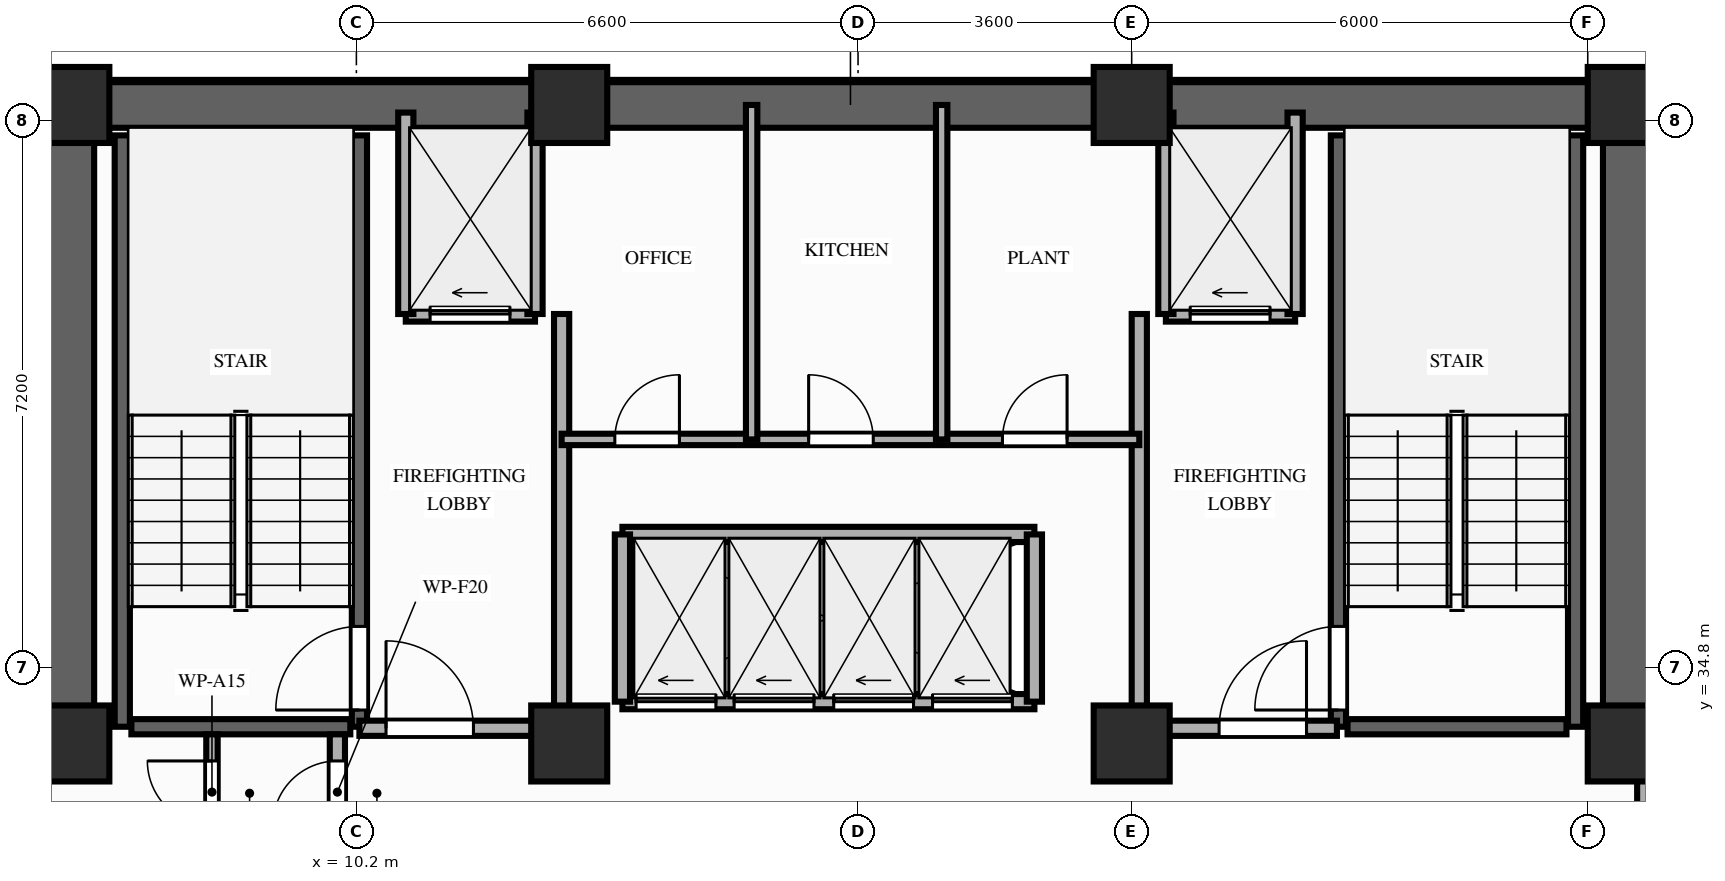
"""IFC4 building model, lengths in metres.
Left out: names, types, materials, properties, quantities, classifications, styles, units other than length and angle.
Written with IfcOpenShell. Run it as: python <this file> out.ifc"""

import sys

from ifc_helpers import new_model, si_unit, direction, frame, frame_2d, origin, origin_2d, place, context, subcontext, project, spatial, rectangle, extrude, element, fill, save


model = new_model("IFC4")
c1 = context("Model", 3, precision=1e-05, world=origin(), true_north=direction((0.0, 1.0)))
c2 = subcontext(c1, "Body", "Model", "MODEL_VIEW")
j1 = project(units=[si_unit("LENGTHUNIT", "METRE"), si_unit("PLANEANGLEUNIT", "RADIAN")], contexts=[c1])
p1 = place(None, origin())
s1 = spatial("IfcSite", under=j1, at=p1, CompositionType="ELEMENT")
p2 = place(p1, origin())
s2 = spatial("IfcBuilding", under=s1, at=p2, CompositionType="ELEMENT")
p3 = place(p2, frame((0.0, 0.0, 123.4)))
s3 = spatial("IfcBuildingStorey", under=s2, at=p3, CompositionType="ELEMENT", Elevation=123.4)
for number, where, z_axis, x_axis in (
    (1, (6.45, 33.8, 0.0), (0.0, 0.0, 1.0), (1.0, 0.0, 0.0)),
    (2, (13.0, 33.8, 0.0), (0.0, 0.0, 1.0), (1.0, 0.0, 0.0)),
    (3, (20.4, 33.8, 0.0), (0.0, 0.0, 1.0), (1.0, 0.0, 0.0)),
    (4, (26.9, 33.8, 0.0), (0.0, 0.0, 1.0), (1.0, 0.0, 0.0)),
    (5, (6.45, 42.2, 0.0), (0.0, 0.0, 1.0), (1.0, 0.0, 0.0)),
    (6, (13.0, 42.2, 0.0), (0.0, 0.0, 1.0), (1.0, 0.0, 0.0)),
    (7, (20.4, 42.2, 0.0), (0.0, 0.0, 1.0), (1.0, 0.0, 0.0)),
    (8, (26.9, 42.2, 0.0), (0.0, 0.0, 1.0), (1.0, 0.0, 0.0)),
):
    element("IfcColumn", number, at=place(p3, frame(where, z_axis=z_axis, x_axis=x_axis)), inside=s3, PredefinedType="COLUMN", context=c2, shape_type="SweptSolid", body=[
        extrude(rectangle(XDim=1.0, YDim=1.0, at=origin_2d()), origin(), (0.0, 0.0, 1.0), 3.2),
    ])
p4 = place(p3, frame((6.45, 42.2, 0.0), z_axis=(0.0, 0.0, 1.0), x_axis=(1.0, 0.0, 0.0)))
e9 = element("IfcWall", 9, at=p4, inside=s3, PredefinedType="SHEAR", context=c2, shape_type="SweptSolid", body=[
    extrude(rectangle(XDim=20.45, YDim=0.6, at=frame_2d((10.225, 0.0))), origin(), (0.0, 0.0, 1.0), 3.02),
])
for number, where, z_axis, x_axis in (
    (10, (6.45, 33.8, 0.0), (0.0, 0.0, 1.0), (0.0, 1.0, 0.0)),
    (11, (26.9, 33.8, 0.0), (0.0, 0.0, 1.0), (0.0, 1.0, 0.0)),
):
    element("IfcWall", number, at=place(p3, frame(where, z_axis=z_axis, x_axis=x_axis)), inside=s3, PredefinedType="SHEAR", context=c2, shape_type="SweptSolid", body=[
        extrude(rectangle(XDim=7.95, YDim=0.6, at=frame_2d((3.975, 0.0))), origin(), (0.0, 0.0, 1.0), 3.02),
    ])
p5 = place(p3, frame((7.12, 34.02, 0.0), z_axis=(0.0, 0.0, 1.0), x_axis=(0.0, 1.0, 0.0)))
e12 = element("IfcWall", 12, at=p5, inside=s3, PredefinedType="SHEAR", context=c2, shape_type="SweptSolid", body=[
    extrude(rectangle(XDim=7.78, YDim=0.2, at=frame_2d((3.89, 0.0))), origin(), (0.0, 0.0, 1.0), 3.02),
])
p6 = place(p3, frame((10.24, 34.02, 0.0), z_axis=(0.0, 0.0, 1.0), x_axis=(0.0, 1.0, 0.0)))
e13 = element("IfcWall", 13, at=p6, inside=s3, PredefinedType="SHEAR", context=c2, shape_type="SweptSolid", body=[
    extrude(rectangle(XDim=7.78, YDim=0.2, at=frame_2d((3.89, 0.0))), origin(), (0.0, 0.0, 1.0), 3.02),
])
p7 = place(p6, frame((0.22, 0.0, 0.0)))
e14 = element("IfcOpeningElement", 14, at=p7, cuts=e13, PredefinedType="OPENING", context=c2, shape_type="SweptSolid", body=[
    extrude(rectangle(XDim=1.1, YDim=2.15, at=frame_2d((0.55, 1.075))), frame((0.0, 0.11, 0.0), z_axis=(0.0, -1.0, 0.0), x_axis=(1.0, 0.0, 0.0)), (0.0, 0.0, 1.0), 0.22),
])
p8 = place(p3, frame((7.24, 34.02, 0.0), z_axis=(0.0, 0.0, 1.0), x_axis=(1.0, 0.0, 0.0)))
e15 = element("IfcWall", 15, at=p8, inside=s3, PredefinedType="SHEAR", context=c2, shape_type="SweptSolid", body=[
    extrude(rectangle(XDim=2.88, YDim=0.2, at=frame_2d((1.44, 0.0))), origin(), (0.0, 0.0, 1.0), 3.02),
])
p9 = place(p3, frame((23.12, 34.02, 0.0), z_axis=(0.0, 0.0, 1.0), x_axis=(0.0, 1.0, 0.0)))
e16 = element("IfcWall", 16, at=p9, inside=s3, PredefinedType="SHEAR", context=c2, shape_type="SweptSolid", body=[
    extrude(rectangle(XDim=7.78, YDim=0.2, at=frame_2d((3.89, 0.0))), origin(), (0.0, 0.0, 1.0), 3.02),
])
p10 = place(p9, frame((0.22, 0.0, 0.0)))
e17 = element("IfcOpeningElement", 17, at=p10, cuts=e16, PredefinedType="OPENING", context=c2, shape_type="SweptSolid", body=[
    extrude(rectangle(XDim=1.1, YDim=2.15, at=frame_2d((0.55, 1.075))), frame((0.0, 0.11, 0.0), z_axis=(0.0, -1.0, 0.0), x_axis=(1.0, 0.0, 0.0)), (0.0, 0.0, 1.0), 0.22),
])
p11 = place(p3, frame((26.24, 34.02, 0.0), z_axis=(0.0, 0.0, 1.0), x_axis=(0.0, 1.0, 0.0)))
e18 = element("IfcWall", 18, at=p11, inside=s3, PredefinedType="SHEAR", context=c2, shape_type="SweptSolid", body=[
    extrude(rectangle(XDim=7.78, YDim=0.2, at=frame_2d((3.89, 0.0))), origin(), (0.0, 0.0, 1.0), 3.02),
])
p12 = place(p3, frame((23.24, 34.02, 0.0), z_axis=(0.0, 0.0, 1.0), x_axis=(1.0, 0.0, 0.0)))
e19 = element("IfcWall", 19, at=p12, inside=s3, PredefinedType="SHEAR", context=c2, shape_type="SweptSolid", body=[
    extrude(rectangle(XDim=2.88, YDim=0.2, at=frame_2d((1.44, 0.0))), origin(), (0.0, 0.0, 1.0), 3.02),
])
p13 = place(p3, frame((10.85, 39.45, 0.0), z_axis=(0.0, 0.0, 1.0), x_axis=(1.0, 0.0, 0.0)))
e20 = element("IfcWall", 20, at=p13, inside=s3, PredefinedType="MOVABLE", context=c2, shape_type="SweptSolid", body=[
    extrude(rectangle(XDim=1.7, YDim=0.2, at=frame_2d((0.85, 0.0))), origin(), (0.0, 0.0, 1.0), 3.02),
])
p14 = place(p13, frame((0.32, 0.0, 0.0)))
e21 = element("IfcOpeningElement", 21, at=p14, cuts=e20, PredefinedType="OPENING", context=c2, shape_type="SweptSolid", body=[
    extrude(rectangle(XDim=1.05, YDim=2.15, at=frame_2d((0.525, 1.075))), frame((0.0, 0.11, 0.0), z_axis=(0.0, -1.0, 0.0), x_axis=(1.0, 0.0, 0.0)), (0.0, 0.0, 1.0), 0.22),
])
p15 = place(p3, frame((20.85, 39.45, 0.0), z_axis=(0.0, 0.0, 1.0), x_axis=(1.0, 0.0, 0.0)))
e22 = element("IfcWall", 22, at=p15, inside=s3, PredefinedType="MOVABLE", context=c2, shape_type="SweptSolid", body=[
    extrude(rectangle(XDim=1.7, YDim=0.2, at=frame_2d((0.85, 0.0))), origin(), (0.0, 0.0, 1.0), 3.02),
])
p16 = place(p15, frame((0.32, 0.0, 0.0)))
e23 = element("IfcOpeningElement", 23, at=p16, cuts=e22, PredefinedType="OPENING", context=c2, shape_type="SweptSolid", body=[
    extrude(rectangle(XDim=1.05, YDim=2.15, at=frame_2d((0.525, 1.075))), frame((0.0, 0.11, 0.0), z_axis=(0.0, -1.0, 0.0), x_axis=(1.0, 0.0, 0.0)), (0.0, 0.0, 1.0), 0.22),
])
for number, where, z_axis, x_axis in (
    (24, (10.85, 39.45, 0.0), (0.0, 0.0, 1.0), (0.0, 1.0, 0.0)),
    (25, (12.55, 39.45, 0.0), (0.0, 0.0, 1.0), (0.0, 1.0, 0.0)),
):
    element("IfcWall", number, at=place(p3, frame(where, z_axis=z_axis, x_axis=x_axis)), inside=s3, PredefinedType="MOVABLE", context=c2, shape_type="SweptSolid", body=[
        extrude(rectangle(XDim=2.65, YDim=0.2, at=frame_2d((1.325, 0.0))), origin(), (0.0, 0.0, 1.0), 2.45),
    ])
p17 = place(p3, frame((12.9, 34.0, 0.0), z_axis=(0.0, 0.0, 1.0), x_axis=(0.0, 1.0, 0.0)))
e26 = element("IfcWall", 26, at=p17, inside=s3, PredefinedType="PARTITIONING", context=c2, shape_type="SweptSolid", body=[
    extrude(rectangle(XDim=5.45, YDim=0.2, at=frame_2d((2.725, 0.0))), origin(), (0.0, 0.0, 1.0), 2.45),
])
p18 = place(p3, frame((10.24, 34.0, 0.0), z_axis=(0.0, 0.0, 1.0), x_axis=(1.0, 0.0, 0.0)))
e27 = element("IfcWall", 27, at=p18, inside=s3, PredefinedType="PARTITIONING", context=c2, shape_type="SweptSolid", body=[
    extrude(rectangle(XDim=2.66, YDim=0.2, at=frame_2d((1.33, 0.0))), origin(), (0.0, 0.0, 1.0), 2.45),
])
p19 = place(p18, frame((0.35, 0.0, 0.0)))
e28 = element("IfcOpeningElement", 28, at=p19, cuts=e27, PredefinedType="OPENING", context=c2, shape_type="SweptSolid", body=[
    extrude(rectangle(XDim=1.15, YDim=2.15, at=frame_2d((0.575, 1.075))), frame((0.0, 0.11, 0.0), z_axis=(0.0, -1.0, 0.0), x_axis=(1.0, 0.0, 0.0)), (0.0, 0.0, 1.0), 0.22),
])
for number, where, z_axis, x_axis in (
    (29, (20.85, 39.45, 0.0), (0.0, 0.0, 1.0), (0.0, 1.0, 0.0)),
    (30, (22.55, 39.45, 0.0), (0.0, 0.0, 1.0), (0.0, 1.0, 0.0)),
):
    element("IfcWall", number, at=place(p3, frame(where, z_axis=z_axis, x_axis=x_axis)), inside=s3, PredefinedType="MOVABLE", context=c2, shape_type="SweptSolid", body=[
        extrude(rectangle(XDim=2.65, YDim=0.2, at=frame_2d((1.325, 0.0))), origin(), (0.0, 0.0, 1.0), 2.45),
    ])
p20 = place(p3, frame((20.5, 34.0, 0.0), z_axis=(0.0, 0.0, 1.0), x_axis=(0.0, 1.0, 0.0)))
e31 = element("IfcWall", 31, at=p20, inside=s3, PredefinedType="PARTITIONING", context=c2, shape_type="SweptSolid", body=[
    extrude(rectangle(XDim=5.45, YDim=0.2, at=frame_2d((2.725, 0.0))), origin(), (0.0, 0.0, 1.0), 2.45),
])
p21 = place(p3, frame((20.5, 34.0, 0.0), z_axis=(0.0, 0.0, 1.0), x_axis=(1.0, 0.0, 0.0)))
e32 = element("IfcWall", 32, at=p21, inside=s3, PredefinedType="PARTITIONING", context=c2, shape_type="SweptSolid", body=[
    extrude(rectangle(XDim=2.6, YDim=0.2, at=frame_2d((1.3, 0.0))), origin(), (0.0, 0.0, 1.0), 2.45),
])
p22 = place(p21, frame((1.05, 0.0, 0.0)))
e33 = element("IfcOpeningElement", 33, at=p22, cuts=e32, PredefinedType="OPENING", context=c2, shape_type="SweptSolid", body=[
    extrude(rectangle(XDim=1.15, YDim=2.15, at=frame_2d((0.575, 1.075))), frame((0.0, 0.11, 0.0), z_axis=(0.0, -1.0, 0.0), x_axis=(1.0, 0.0, 0.0)), (0.0, 0.0, 1.0), 0.22),
])
p23 = place(p3, frame((9.95, 32.4, 0.0), z_axis=(0.0, 0.0, 1.0), x_axis=(0.0, 1.0, 0.0)))
e34 = element("IfcWall", 34, at=p23, inside=s3, PredefinedType="PARTITIONING", context=c2, shape_type="SweptSolid", body=[
    extrude(rectangle(XDim=1.52, YDim=0.2, at=frame_2d((0.76, 0.0))), origin(), (0.0, 0.0, 1.0), 2.45),
])
p24 = place(p23, frame((0.32, 0.0, 0.0)))
e35 = element("IfcOpeningElement", 35, at=p24, cuts=e34, PredefinedType="OPENING", context=c2, shape_type="SweptSolid", body=[
    extrude(rectangle(XDim=0.85, YDim=2.05, at=frame_2d((0.425, 1.025))), frame((0.0, 0.11, 0.0), z_axis=(0.0, -1.0, 0.0), x_axis=(1.0, 0.0, 0.0)), (0.0, 0.0, 1.0), 0.22),
])
p25 = place(p3, frame((8.3, 32.4, 0.0), z_axis=(0.0, 0.0, 1.0), x_axis=(0.0, 1.0, 0.0)))
e36 = element("IfcWall", 36, at=p25, inside=s3, PredefinedType="PARTITIONING", context=c2, shape_type="SweptSolid", body=[
    extrude(rectangle(XDim=1.52, YDim=0.15, at=frame_2d((0.76, 0.0))), origin(), (0.0, 0.0, 1.0), 2.45),
])
p26 = place(p25, frame((0.32, 0.0, 0.0)))
e37 = element("IfcOpeningElement", 37, at=p26, cuts=e36, PredefinedType="OPENING", context=c2, shape_type="SweptSolid", body=[
    extrude(rectangle(XDim=0.85, YDim=2.05, at=frame_2d((0.425, 1.025))), frame((0.0, 0.085, 0.0), z_axis=(0.0, -1.0, 0.0), x_axis=(1.0, 0.0, 0.0)), (0.0, 0.0, 1.0), 0.17),
])
p27 = place(p3, frame((12.9, 37.8, 0.0), z_axis=(0.0, 0.0, 1.0), x_axis=(1.0, 0.0, 0.0)))
e38 = element("IfcWall", 38, at=p27, inside=s3, PredefinedType="PARTITIONING", context=c2, shape_type="SweptSolid", body=[
    extrude(rectangle(XDim=7.6, YDim=0.15, at=frame_2d((3.8, 0.0))), origin(), (0.0, 0.0, 1.0), 3.02),
])
p28 = place(p27, frame((0.7, 0.0, 0.0)))
e39 = element("IfcOpeningElement", 39, at=p28, cuts=e38, PredefinedType="OPENING", context=c2, shape_type="SweptSolid", body=[
    extrude(rectangle(XDim=0.85, YDim=2.05, at=frame_2d((0.425, 1.025))), frame((0.0, 0.085, 0.0), z_axis=(0.0, -1.0, 0.0), x_axis=(1.0, 0.0, 0.0)), (0.0, 0.0, 1.0), 0.17),
])
p29 = place(p27, frame((3.25, 0.0, 0.0)))
e40 = element("IfcOpeningElement", 40, at=p29, cuts=e38, PredefinedType="OPENING", context=c2, shape_type="SweptSolid", body=[
    extrude(rectangle(XDim=0.85, YDim=2.05, at=frame_2d((0.425, 1.025))), frame((0.0, 0.085, 0.0), z_axis=(0.0, -1.0, 0.0), x_axis=(1.0, 0.0, 0.0)), (0.0, 0.0, 1.0), 0.17),
])
p30 = place(p27, frame((5.8, 0.0, 0.0)))
e41 = element("IfcOpeningElement", 41, at=p30, cuts=e38, PredefinedType="OPENING", context=c2, shape_type="SweptSolid", body=[
    extrude(rectangle(XDim=0.85, YDim=2.05, at=frame_2d((0.425, 1.025))), frame((0.0, 0.085, 0.0), z_axis=(0.0, -1.0, 0.0), x_axis=(1.0, 0.0, 0.0)), (0.0, 0.0, 1.0), 0.17),
])
for number, where, z_axis, x_axis in (
    (42, (15.4, 37.8, 0.0), (0.0, 0.0, 1.0), (0.0, 1.0, 0.0)),
    (43, (17.9, 37.8, 0.0), (0.0, 0.0, 1.0), (0.0, 1.0, 0.0)),
):
    element("IfcWall", number, at=place(p3, frame(where, z_axis=z_axis, x_axis=x_axis)), inside=s3, PredefinedType="PARTITIONING", context=c2, shape_type="SweptSolid", body=[
        extrude(rectangle(XDim=4.4, YDim=0.15, at=frame_2d((2.2, 0.0))), origin(), (0.0, 0.0, 1.0), 2.45),
    ])
p31 = place(p3, frame((13.7, 34.35, 0.0), z_axis=(0.0, 0.0, 1.0), x_axis=(1.0, 0.0, 0.0)))
e44 = element("IfcWall", 44, at=p31, inside=s3, PredefinedType="MOVABLE", context=c2, shape_type="SweptSolid", body=[
    extrude(rectangle(XDim=5.42, YDim=0.2, at=frame_2d((2.71, 0.0))), origin(), (0.0, 0.0, 1.0), 3.02),
])
p32 = place(p31, frame((0.18, 0.0, 0.0)))
e45 = element("IfcOpeningElement", 45, at=p32, cuts=e44, PredefinedType="OPENING", context=c2, shape_type="SweptSolid", body=[
    extrude(rectangle(XDim=1.05, YDim=2.15, at=frame_2d((0.525, 1.075))), frame((0.0, 0.11, 0.0), z_axis=(0.0, -1.0, 0.0), x_axis=(1.0, 0.0, 0.0)), (0.0, 0.0, 1.0), 0.22),
])
p33 = place(p31, frame((1.47, 0.0, 0.0)))
e46 = element("IfcOpeningElement", 46, at=p33, cuts=e44, PredefinedType="OPENING", context=c2, shape_type="SweptSolid", body=[
    extrude(rectangle(XDim=1.05, YDim=2.15, at=frame_2d((0.525, 1.075))), frame((0.0, 0.11, 0.0), z_axis=(0.0, -1.0, 0.0), x_axis=(1.0, 0.0, 0.0)), (0.0, 0.0, 1.0), 0.22),
])
p34 = place(p31, frame((2.78, 0.0, 0.0)))
e47 = element("IfcOpeningElement", 47, at=p34, cuts=e44, PredefinedType="OPENING", context=c2, shape_type="SweptSolid", body=[
    extrude(rectangle(XDim=1.05, YDim=2.15, at=frame_2d((0.525, 1.075))), frame((0.0, 0.11, 0.0), z_axis=(0.0, -1.0, 0.0), x_axis=(1.0, 0.0, 0.0)), (0.0, 0.0, 1.0), 0.22),
])
p35 = place(p31, frame((4.08, 0.0, 0.0)))
e48 = element("IfcOpeningElement", 48, at=p35, cuts=e44, PredefinedType="OPENING", context=c2, shape_type="SweptSolid", body=[
    extrude(rectangle(XDim=1.05, YDim=2.15, at=frame_2d((0.525, 1.075))), frame((0.0, 0.11, 0.0), z_axis=(0.0, -1.0, 0.0), x_axis=(1.0, 0.0, 0.0)), (0.0, 0.0, 1.0), 0.22),
])
p36 = place(p3, frame((13.7, 36.55, 0.0), z_axis=(0.0, 0.0, 1.0), x_axis=(1.0, 0.0, 0.0)))
e49 = element("IfcWall", 49, at=p36, inside=s3, PredefinedType="MOVABLE", context=c2, shape_type="SweptSolid", body=[
    extrude(rectangle(XDim=5.42, YDim=0.2, at=frame_2d((2.71, 0.0))), origin(), (0.0, 0.0, 1.0), 3.02),
])
for number, where, z_axis, x_axis in (
    (50, (13.7, 34.35, 0.0), (0.0, 0.0, 1.0), (0.0, 1.0, 0.0)),
    (51, (19.12, 34.35, 0.0), (0.0, 0.0, 1.0), (0.0, 1.0, 0.0)),
):
    element("IfcWall", number, at=place(p3, frame(where, z_axis=z_axis, x_axis=x_axis)), inside=s3, PredefinedType="MOVABLE", context=c2, shape_type="SweptSolid", body=[
        extrude(rectangle(XDim=2.2, YDim=0.2, at=frame_2d((1.1, 0.0))), origin(), (0.0, 0.0, 1.0), 3.02),
    ])
p37 = place(p3, frame((27.15, 32.6, 0.0), z_axis=(0.0, 0.0, 1.0), x_axis=(0.0, 1.0, 0.0)))
e52 = element("IfcWall", 52, at=p37, inside=s3, PredefinedType="PARTITIONING", context=c2, shape_type="SweptSolid", body=[
    extrude(rectangle(XDim=1.08, YDim=0.2, at=frame_2d((0.54, 0.0))), origin(), (0.0, 0.0, 1.0), 2.45),
])
p38 = place(p7, origin())
e53 = element("IfcDoor", 53, at=p38, inside=s3, OperationType="SINGLE_SWING_LEFT", PredefinedType="DOOR", context=c2, shape_type="SweptSolid", body=[
    extrude(rectangle(XDim=1.1, YDim=2.15, at=frame_2d((0.55, 1.075))), frame((0.0, 0.025, 0.0), z_axis=(0.0, -1.0, 0.0), x_axis=(1.0, 0.0, 0.0)), (0.0, 0.0, 1.0), 0.05),
])
fill(e14, e53)
p39 = place(p10, origin())
e54 = element("IfcDoor", 54, at=p39, inside=s3, OperationType="SINGLE_SWING_LEFT", PredefinedType="DOOR", context=c2, shape_type="SweptSolid", body=[
    extrude(rectangle(XDim=1.1, YDim=2.15, at=frame_2d((0.55, 1.075))), frame((0.0, 0.025, 0.0), z_axis=(0.0, -1.0, 0.0), x_axis=(1.0, 0.0, 0.0)), (0.0, 0.0, 1.0), 0.05),
])
fill(e17, e54)
p40 = place(p14, origin())
e55 = element("IfcDoor", 55, at=p40, inside=s3, OperationType="SLIDING_TO_LEFT", PredefinedType="DOOR", context=c2, shape_type="SweptSolid", body=[
    extrude(rectangle(XDim=1.05, YDim=2.15, at=frame_2d((0.525, 1.075))), frame((0.0, 0.025, 0.0), z_axis=(0.0, -1.0, 0.0), x_axis=(1.0, 0.0, 0.0)), (0.0, 0.0, 1.0), 0.05),
])
fill(e21, e55)
p41 = place(p16, origin())
e56 = element("IfcDoor", 56, at=p41, inside=s3, OperationType="SLIDING_TO_LEFT", PredefinedType="DOOR", context=c2, shape_type="SweptSolid", body=[
    extrude(rectangle(XDim=1.05, YDim=2.15, at=frame_2d((0.525, 1.075))), frame((0.0, 0.025, 0.0), z_axis=(0.0, -1.0, 0.0), x_axis=(1.0, 0.0, 0.0)), (0.0, 0.0, 1.0), 0.05),
])
fill(e23, e56)
p42 = place(p19, origin())
e57 = element("IfcDoor", 57, at=p42, inside=s3, OperationType="SINGLE_SWING_LEFT", PredefinedType="DOOR", context=c2, shape_type="SweptSolid", body=[
    extrude(rectangle(XDim=1.15, YDim=2.15, at=frame_2d((0.575, 1.075))), frame((0.0, 0.025, 0.0), z_axis=(0.0, -1.0, 0.0), x_axis=(1.0, 0.0, 0.0)), (0.0, 0.0, 1.0), 0.05),
])
fill(e28, e57)
p43 = place(p22, origin())
e58 = element("IfcDoor", 58, at=p43, inside=s3, OperationType="SINGLE_SWING_RIGHT", PredefinedType="DOOR", context=c2, shape_type="SweptSolid", body=[
    extrude(rectangle(XDim=1.15, YDim=2.15, at=frame_2d((0.575, 1.075))), frame((0.0, 0.025, 0.0), z_axis=(0.0, -1.0, 0.0), x_axis=(1.0, 0.0, 0.0)), (0.0, 0.0, 1.0), 0.05),
])
fill(e33, e58)
p44 = place(p24, origin())
e59 = element("IfcDoor", 59, at=p44, inside=s3, OperationType="SINGLE_SWING_LEFT", PredefinedType="DOOR", context=c2, shape_type="SweptSolid", body=[
    extrude(rectangle(XDim=0.85, YDim=2.05, at=frame_2d((0.425, 1.025))), frame((0.0, 0.025, 0.0), z_axis=(0.0, -1.0, 0.0), x_axis=(1.0, 0.0, 0.0)), (0.0, 0.0, 1.0), 0.05),
])
fill(e35, e59)
p45 = place(p26, origin())
e60 = element("IfcDoor", 60, at=p45, inside=s3, OperationType="SINGLE_SWING_RIGHT", PredefinedType="DOOR", context=c2, shape_type="SweptSolid", body=[
    extrude(rectangle(XDim=0.85, YDim=2.05, at=frame_2d((0.425, 1.025))), frame((0.0, 0.025, 0.0), z_axis=(0.0, -1.0, 0.0), x_axis=(1.0, 0.0, 0.0)), (0.0, 0.0, 1.0), 0.05),
])
fill(e37, e60)
p46 = place(p28, origin())
e61 = element("IfcDoor", 61, at=p46, inside=s3, OperationType="SINGLE_SWING_RIGHT", PredefinedType="DOOR", context=c2, shape_type="SweptSolid", body=[
    extrude(rectangle(XDim=0.85, YDim=2.05, at=frame_2d((0.425, 1.025))), frame((0.0, 0.025, 0.0), z_axis=(0.0, -1.0, 0.0), x_axis=(1.0, 0.0, 0.0)), (0.0, 0.0, 1.0), 0.05),
])
fill(e39, e61)
p47 = place(p29, origin())
e62 = element("IfcDoor", 62, at=p47, inside=s3, OperationType="SINGLE_SWING_LEFT", PredefinedType="DOOR", context=c2, shape_type="SweptSolid", body=[
    extrude(rectangle(XDim=0.85, YDim=2.05, at=frame_2d((0.425, 1.025))), frame((0.0, 0.025, 0.0), z_axis=(0.0, -1.0, 0.0), x_axis=(1.0, 0.0, 0.0)), (0.0, 0.0, 1.0), 0.05),
])
fill(e40, e62)
p48 = place(p30, origin())
e63 = element("IfcDoor", 63, at=p48, inside=s3, OperationType="SINGLE_SWING_RIGHT", PredefinedType="DOOR", context=c2, shape_type="SweptSolid", body=[
    extrude(rectangle(XDim=0.85, YDim=2.05, at=frame_2d((0.425, 1.025))), frame((0.0, 0.025, 0.0), z_axis=(0.0, -1.0, 0.0), x_axis=(1.0, 0.0, 0.0)), (0.0, 0.0, 1.0), 0.05),
])
fill(e41, e63)
p49 = place(p32, origin())
e64 = element("IfcDoor", 64, at=p49, inside=s3, OperationType="SLIDING_TO_LEFT", PredefinedType="DOOR", context=c2, shape_type="SweptSolid", body=[
    extrude(rectangle(XDim=1.05, YDim=2.15, at=frame_2d((0.525, 1.075))), frame((0.0, 0.025, 0.0), z_axis=(0.0, -1.0, 0.0), x_axis=(1.0, 0.0, 0.0)), (0.0, 0.0, 1.0), 0.05),
])
fill(e45, e64)
p50 = place(p33, origin())
e65 = element("IfcDoor", 65, at=p50, inside=s3, OperationType="SLIDING_TO_LEFT", PredefinedType="DOOR", context=c2, shape_type="SweptSolid", body=[
    extrude(rectangle(XDim=1.05, YDim=2.15, at=frame_2d((0.525, 1.075))), frame((0.0, 0.025, 0.0), z_axis=(0.0, -1.0, 0.0), x_axis=(1.0, 0.0, 0.0)), (0.0, 0.0, 1.0), 0.05),
])
fill(e46, e65)
p51 = place(p34, origin())
e66 = element("IfcDoor", 66, at=p51, inside=s3, OperationType="SLIDING_TO_LEFT", PredefinedType="DOOR", context=c2, shape_type="SweptSolid", body=[
    extrude(rectangle(XDim=1.05, YDim=2.15, at=frame_2d((0.525, 1.075))), frame((0.0, 0.025, 0.0), z_axis=(0.0, -1.0, 0.0), x_axis=(1.0, 0.0, 0.0)), (0.0, 0.0, 1.0), 0.05),
])
fill(e47, e66)
p52 = place(p35, origin())
e67 = element("IfcDoor", 67, at=p52, inside=s3, OperationType="SLIDING_TO_LEFT", PredefinedType="DOOR", context=c2, shape_type="SweptSolid", body=[
    extrude(rectangle(XDim=1.05, YDim=2.15, at=frame_2d((0.525, 1.075))), frame((0.0, 0.025, 0.0), z_axis=(0.0, -1.0, 0.0), x_axis=(1.0, 0.0, 0.0)), (0.0, 0.0, 1.0), 0.05),
])
fill(e48, e67)
save(model, sys.argv[1])
